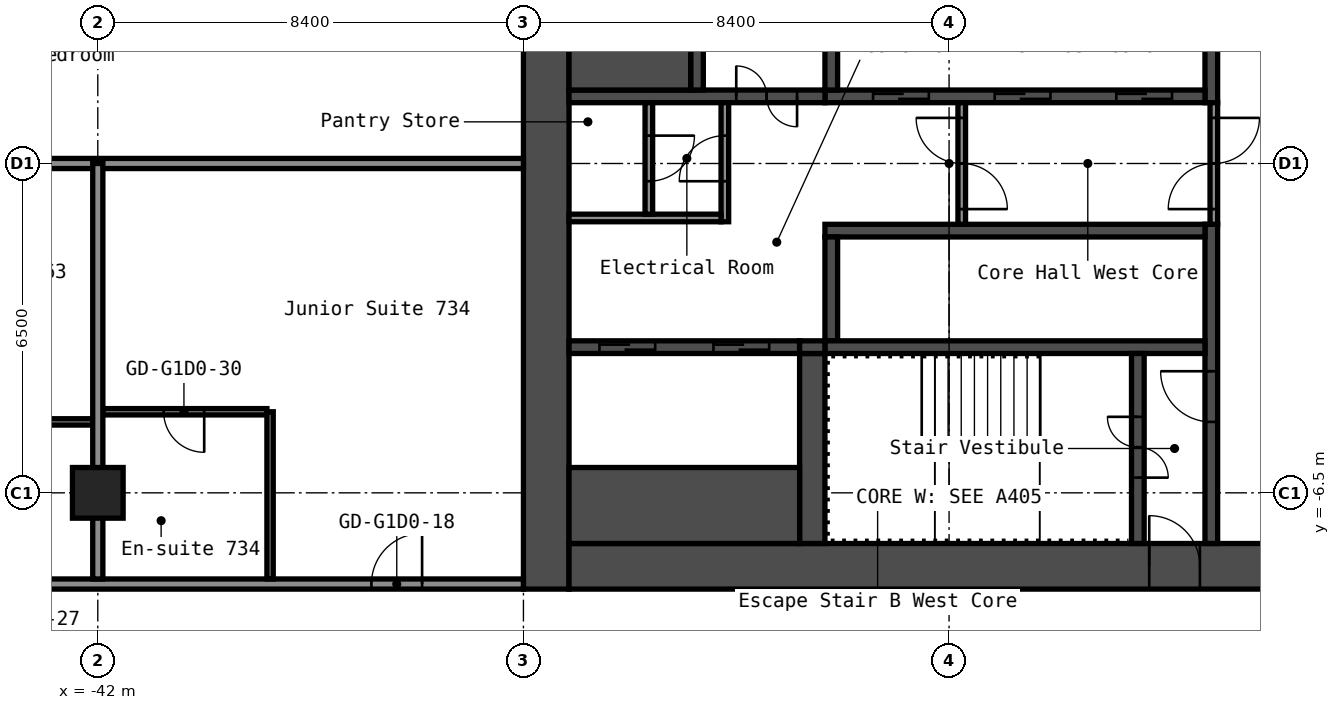
"""IFC4 building model, lengths in metres.
Left out: names, types, materials, properties, quantities, classifications, styles, units other than length and angle.
Written with IfcOpenShell. Run it as: python <this file> out.ifc"""

import sys

from ifc_helpers import new_model, si_unit, direction, frame, frame_2d, origin, origin_2d, place, context, subcontext, project, spatial, rectangle, hollow_rectangle, extrude, element, fill, save


model = new_model("IFC4")
c1 = context("Model", 3, precision=1e-05, world=origin(), true_north=direction((0.0, 1.0)))
c2 = subcontext(c1, "Body", "Model", "MODEL_VIEW")
j1 = project(units=[si_unit("LENGTHUNIT", "METRE"), si_unit("PLANEANGLEUNIT", "RADIAN")], contexts=[c1])
p1 = place(None, origin())
s1 = spatial("IfcSite", under=j1, at=p1, CompositionType="ELEMENT")
p2 = place(p1, origin())
s2 = spatial("IfcBuilding", under=s1, at=p2, CompositionType="ELEMENT")
p3 = place(p2, frame((0.0, 0.0, 29.4)))
s3 = spatial("IfcBuildingStorey", under=s2, at=p3, CompositionType="ELEMENT", Elevation=29.4)
p4 = place(p3, frame((-42.0, -6.5, 0.0), z_axis=(0.0, 0.0, 1.0), x_axis=(1.0, 0.0, 0.0)))
e1 = element("IfcColumn", 1, at=p4, inside=s3, PredefinedType="COLUMN", context=c2, shape_type="SweptSolid", body=[
    extrude(hollow_rectangle(XDim=1.0, YDim=1.0, WallThickness=0.04, at=origin_2d()), origin(), (0.0, 0.0, 1.0), 2.8),
])
p5 = place(p3, frame((-33.15, -8.4, 0.0), z_axis=(0.0, 0.0, 1.0), x_axis=(0.0, 1.0, 0.0)))
e2 = element("IfcWall", 2, at=p5, inside=s3, PredefinedType="SHEAR", context=c2, shape_type="SweptSolid", body=[
    extrude(rectangle(XDim=16.8, YDim=0.9, at=frame_2d((8.4, 0.0))), origin(), (0.0, 0.0, 1.0), 2.8),
])
p6 = place(p3, frame((-32.7, -7.95, 0.0), z_axis=(0.0, 0.0, 1.0), x_axis=(1.0, 0.0, 0.0)))
e3 = element("IfcWall", 3, at=p6, inside=s3, PredefinedType="SHEAR", context=c2, shape_type="SweptSolid", body=[
    extrude(rectangle(XDim=15.0, YDim=0.9, at=frame_2d((7.5, 0.0))), origin(), (0.0, 0.0, 1.0), 2.8),
])
p7 = place(p6, frame((11.45, 0.0, 0.0)))
e4 = element("IfcOpeningElement", 4, at=p7, cuts=e3, PredefinedType="OPENING", context=c2, shape_type="SweptSolid", body=[
    extrude(rectangle(XDim=1.0, YDim=2.1, at=frame_2d((0.5, 1.05))), frame((0.0, 0.46, 0.0), z_axis=(0.0, -1.0, 0.0), x_axis=(1.0, 0.0, 0.0)), (0.0, 0.0, 1.0), 0.92),
])
p8 = place(p3, frame((-20.025, 1.2, 0.0), z_axis=(0.0, 0.0, 1.0), x_axis=(0.0, 1.0, 0.0)))
e5 = element("IfcWall", 5, at=p8, inside=s3, PredefinedType="SHEAR", context=c2, shape_type="SweptSolid", body=[
    extrude(rectangle(XDim=6.3, YDim=0.25, at=frame_2d((3.15, 0.0))), origin(), (0.0, 0.0, 1.0), 2.8),
])
p9 = place(p3, frame((-20.025, -7.5, 0.0), z_axis=(0.0, 0.0, 1.0), x_axis=(0.0, 1.0, 0.0)))
e6 = element("IfcWall", 6, at=p9, inside=s3, PredefinedType="SHEAR", context=c2, shape_type="SweptSolid", body=[
    extrude(rectangle(XDim=6.3, YDim=0.25, at=frame_2d((3.15, 0.0))), origin(), (0.0, 0.0, 1.0), 2.8),
])
p10 = place(p9, frame((2.4, 0.0, 0.0)))
e7 = element("IfcOpeningElement", 7, at=p10, cuts=e6, PredefinedType="OPENING", context=c2, shape_type="SweptSolid", body=[
    extrude(rectangle(XDim=1.0, YDim=2.1, at=frame_2d((0.5, 1.05))), frame((0.0, 0.135, 0.0), z_axis=(0.0, -1.0, 0.0), x_axis=(1.0, 0.0, 0.0)), (0.0, 0.0, 1.0), 0.27),
])
p11 = place(p3, frame((-27.65, 1.325, 0.0), z_axis=(0.0, 0.0, 1.0), x_axis=(1.0, 0.0, 0.0)))
e8 = element("IfcWall", 8, at=p11, inside=s3, PredefinedType="SHEAR", context=c2, shape_type="SweptSolid", body=[
    extrude(rectangle(XDim=7.5, YDim=0.25, at=frame_2d((3.75, 0.0))), origin(), (0.0, 0.0, 1.0), 2.8),
])
p12 = place(p11, frame((5.75, 0.0, 0.0)))
e9 = element("IfcOpeningElement", 9, at=p12, cuts=e8, PredefinedType="OPENING", context=c2, shape_type="SweptSolid", body=[
    extrude(rectangle(XDim=1.1, YDim=2.1, at=frame_2d((0.55, 1.05))), frame((0.0, 0.135, 0.0), z_axis=(0.0, -1.0, 0.0), x_axis=(1.0, 0.0, 0.0)), (0.0, 0.0, 1.0), 0.27),
])
p13 = place(p11, frame((3.35, 0.0, 0.0)))
e10 = element("IfcOpeningElement", 10, at=p13, cuts=e8, PredefinedType="OPENING", context=c2, shape_type="SweptSolid", body=[
    extrude(rectangle(XDim=1.1, YDim=2.1, at=frame_2d((0.55, 1.05))), frame((0.0, 0.135, 0.0), z_axis=(0.0, -1.0, 0.0), x_axis=(1.0, 0.0, 0.0)), (0.0, 0.0, 1.0), 0.27),
])
p14 = place(p11, frame((0.95, 0.0, 0.0)))
e11 = element("IfcOpeningElement", 11, at=p14, cuts=e8, PredefinedType="OPENING", context=c2, shape_type="SweptSolid", body=[
    extrude(rectangle(XDim=1.1, YDim=2.1, at=frame_2d((0.55, 1.05))), frame((0.0, 0.135, 0.0), z_axis=(0.0, -1.0, 0.0), x_axis=(1.0, 0.0, 0.0)), (0.0, 0.0, 1.0), 0.27),
])
p15 = place(p3, frame((-27.525, 1.45, 0.0), z_axis=(0.0, 0.0, 1.0), x_axis=(0.0, 1.0, 0.0)))
e12 = element("IfcWall", 12, at=p15, inside=s3, PredefinedType="SHEAR", context=c2, shape_type="SweptSolid", body=[
    extrude(rectangle(XDim=2.05, YDim=0.25, at=frame_2d((1.025, 0.0))), origin(), (0.0, 0.0, 1.0), 2.8),
])
p16 = place(p3, frame((-32.7, 1.325, 0.0), z_axis=(0.0, 0.0, 1.0), x_axis=(1.0, 0.0, 0.0)))
e13 = element("IfcWall", 13, at=p16, inside=s3, PredefinedType="SHEAR", context=c2, shape_type="SweptSolid", body=[
    extrude(rectangle(XDim=5.05, YDim=0.25, at=frame_2d((2.525, 0.0))), origin(), (0.0, 0.0, 1.0), 2.8),
])
p17 = place(p16, frame((3.3, 0.0, 0.0)))
e14 = element("IfcOpeningElement", 14, at=p17, cuts=e13, PredefinedType="OPENING", context=c2, shape_type="SweptSolid", body=[
    extrude(rectangle(XDim=1.2, YDim=2.1, at=frame_2d((0.6, 1.05))), frame((0.0, 0.135, 0.0), z_axis=(0.0, -1.0, 0.0), x_axis=(1.0, 0.0, 0.0)), (0.0, 0.0, 1.0), 0.27),
])
p18 = place(p3, frame((-30.175, 1.45, 0.0), z_axis=(0.0, 0.0, 1.0), x_axis=(0.0, 1.0, 0.0)))
e15 = element("IfcWall", 15, at=p18, inside=s3, PredefinedType="SHEAR", context=c2, shape_type="SweptSolid", body=[
    extrude(rectangle(XDim=6.05, YDim=0.25, at=frame_2d((3.025, 0.0))), origin(), (0.0, 0.0, 1.0), 2.8),
])
p19 = place(p18, frame((2.625, 0.0, 0.0)))
e16 = element("IfcOpeningElement", 16, at=p19, cuts=e15, PredefinedType="OPENING", context=c2, shape_type="SweptSolid", body=[
    extrude(rectangle(XDim=1.1, YDim=2.1, at=frame_2d((0.55, 1.05))), frame((0.0, 0.135, 0.0), z_axis=(0.0, -1.0, 0.0), x_axis=(1.0, 0.0, 0.0)), (0.0, 0.0, 1.0), 0.27),
])
p20 = place(p3, frame((-32.7, 2.375, 0.0), z_axis=(0.0, 0.0, 1.0), x_axis=(1.0, 0.0, 0.0)))
e17 = element("IfcWall", 17, at=p20, inside=s3, PredefinedType="SHEAR", context=c2, shape_type="SweptSolid", body=[
    extrude(rectangle(XDim=2.4, YDim=1.85, at=frame_2d((1.2, 0.0))), origin(), (0.0, 0.0, 1.0), 2.8),
])
p21 = place(p3, frame((-27.65, -1.325, 0.0), z_axis=(0.0, 0.0, 1.0), x_axis=(1.0, 0.0, 0.0)))
e18 = element("IfcWall", 18, at=p21, inside=s3, PredefinedType="SHEAR", context=c2, shape_type="SweptSolid", body=[
    extrude(rectangle(XDim=7.5, YDim=0.25, at=frame_2d((3.75, 0.0))), origin(), (0.0, 0.0, 1.0), 2.8),
])
p22 = place(p3, frame((-27.525, -3.5, 0.0), z_axis=(0.0, 0.0, 1.0), x_axis=(0.0, 1.0, 0.0)))
e19 = element("IfcWall", 19, at=p22, inside=s3, PredefinedType="SHEAR", context=c2, shape_type="SweptSolid", body=[
    extrude(rectangle(XDim=2.05, YDim=0.25, at=frame_2d((1.025, 0.0))), origin(), (0.0, 0.0, 1.0), 2.8),
])
p23 = place(p3, frame((-27.65, -3.625, 0.0), z_axis=(0.0, 0.0, 1.0), x_axis=(1.0, 0.0, 0.0)))
e20 = element("IfcWall", 20, at=p23, inside=s3, PredefinedType="SHEAR", context=c2, shape_type="SweptSolid", body=[
    extrude(rectangle(XDim=7.5, YDim=0.25, at=frame_2d((3.75, 0.0))), origin(), (0.0, 0.0, 1.0), 2.8),
])
p24 = place(p3, frame((-21.475, -7.5, 0.0), z_axis=(0.0, 0.0, 1.0), x_axis=(0.0, 1.0, 0.0)))
e21 = element("IfcWall", 21, at=p24, inside=s3, PredefinedType="SHEAR", context=c2, shape_type="SweptSolid", body=[
    extrude(rectangle(XDim=3.75, YDim=0.25, at=frame_2d((1.875, 0.0))), origin(), (0.0, 0.0, 1.0), 2.8),
])
p25 = place(p24, frame((1.3, 0.0, 0.0)))
e22 = element("IfcOpeningElement", 22, at=p25, cuts=e21, PredefinedType="OPENING", context=c2, shape_type="SweptSolid", body=[
    extrude(rectangle(XDim=1.2, YDim=2.1, at=frame_2d((0.6, 1.05))), frame((0.0, 0.135, 0.0), z_axis=(0.0, -1.0, 0.0), x_axis=(1.0, 0.0, 0.0)), (0.0, 0.0, 1.0), 0.27),
])
p26 = place(p3, frame((-27.9, -7.5, 0.0), z_axis=(0.0, 0.0, 1.0), x_axis=(0.0, 1.0, 0.0)))
e23 = element("IfcWall", 23, at=p26, inside=s3, PredefinedType="SHEAR", context=c2, shape_type="SweptSolid", body=[
    extrude(rectangle(XDim=3.75, YDim=0.5, at=frame_2d((1.875, 0.0))), origin(), (0.0, 0.0, 1.0), 2.8),
])
p27 = place(p3, frame((-32.7, -3.625, 0.0), z_axis=(0.0, 0.0, 1.0), x_axis=(1.0, 0.0, 0.0)))
e24 = element("IfcWall", 24, at=p27, inside=s3, PredefinedType="SHEAR", context=c2, shape_type="SweptSolid", body=[
    extrude(rectangle(XDim=4.55, YDim=0.25, at=frame_2d((2.275, 0.0))), origin(), (0.0, 0.0, 1.0), 2.8),
])
p28 = place(p27, frame((2.85, 0.0, 0.0)))
e25 = element("IfcOpeningElement", 25, at=p28, cuts=e24, PredefinedType="OPENING", context=c2, shape_type="SweptSolid", body=[
    extrude(rectangle(XDim=1.1, YDim=2.1, at=frame_2d((0.55, 1.05))), frame((0.0, 0.135, 0.0), z_axis=(0.0, -1.0, 0.0), x_axis=(1.0, 0.0, 0.0)), (0.0, 0.0, 1.0), 0.27),
])
p29 = place(p27, frame((0.6, 0.0, 0.0)))
e26 = element("IfcOpeningElement", 26, at=p29, cuts=e24, PredefinedType="OPENING", context=c2, shape_type="SweptSolid", body=[
    extrude(rectangle(XDim=1.1, YDim=2.1, at=frame_2d((0.55, 1.05))), frame((0.0, 0.135, 0.0), z_axis=(0.0, -1.0, 0.0), x_axis=(1.0, 0.0, 0.0)), (0.0, 0.0, 1.0), 0.27),
])
p30 = place(p3, frame((-32.7, -6.75, 0.0), z_axis=(0.0, 0.0, 1.0), x_axis=(1.0, 0.0, 0.0)))
e27 = element("IfcWall", 27, at=p30, inside=s3, PredefinedType="SHEAR", context=c2, shape_type="SweptSolid", body=[
    extrude(rectangle(XDim=4.55, YDim=1.5, at=frame_2d((2.275, 0.0))), origin(), (0.0, 0.0, 1.0), 2.8),
])
p31 = place(p3, frame((-28.15, -3.625, 0.0), z_axis=(0.0, 0.0, 1.0), x_axis=(1.0, 0.0, 0.0)))
e28 = element("IfcWall", 28, at=p31, inside=s3, PredefinedType="SHEAR", context=c2, shape_type="SweptSolid", body=[
    extrude(rectangle(XDim=0.5, YDim=0.25, at=frame_2d((0.25, 0.0))), origin(), (0.0, 0.0, 1.0), 2.8),
])
p32 = place(p3, frame((-19.975, -1.2, 0.0), z_axis=(0.0, 0.0, 1.0), x_axis=(0.0, 1.0, 0.0)))
e29 = element("IfcWall", 29, at=p32, inside=s3, PredefinedType="PARTITIONING", context=c2, shape_type="SweptSolid", body=[
    extrude(rectangle(XDim=2.4, YDim=0.15, at=frame_2d((1.2, 0.0))), origin(), (0.0, 0.0, 1.0), 2.8),
])
p33 = place(p32, frame((0.3, 0.0, 0.0)))
e30 = element("IfcOpeningElement", 30, at=p33, cuts=e29, PredefinedType="OPENING", context=c2, shape_type="SweptSolid", body=[
    extrude(rectangle(XDim=1.8, YDim=2.1, at=frame_2d((0.9, 1.05))), frame((0.0, 0.085, 0.0), z_axis=(0.0, -1.0, 0.0), x_axis=(1.0, 0.0, 0.0)), (0.0, 0.0, 1.0), 0.17),
])
p34 = place(p3, frame((-24.95, -1.2, 0.0), z_axis=(0.0, 0.0, 1.0), x_axis=(0.0, 1.0, 0.0)))
e31 = element("IfcWall", 31, at=p34, inside=s3, PredefinedType="PARTITIONING", context=c2, shape_type="SweptSolid", body=[
    extrude(rectangle(XDim=2.4, YDim=0.15, at=frame_2d((1.2, 0.0))), origin(), (0.0, 0.0, 1.0), 2.8),
])
p35 = place(p34, frame((0.3, 0.0, 0.0)))
e32 = element("IfcOpeningElement", 32, at=p35, cuts=e31, PredefinedType="OPENING", context=c2, shape_type="SweptSolid", body=[
    extrude(rectangle(XDim=1.8, YDim=2.1, at=frame_2d((0.9, 1.05))), frame((0.0, 0.085, 0.0), z_axis=(0.0, -1.0, 0.0), x_axis=(1.0, 0.0, 0.0)), (0.0, 0.0, 1.0), 0.17),
])
p36 = place(p3, frame((-29.625, -1.15, 0.0), z_axis=(0.0, 0.0, 1.0), x_axis=(0.0, 1.0, 0.0)))
e33 = element("IfcWall", 33, at=p36, inside=s3, PredefinedType="PARTITIONING", context=c2, shape_type="SweptSolid", body=[
    extrude(rectangle(XDim=2.35, YDim=0.15, at=frame_2d((1.175, 0.0))), origin(), (0.0, 0.0, 1.0), 2.8),
])
p37 = place(p36, frame((0.8, 0.0, 0.0)))
e34 = element("IfcOpeningElement", 34, at=p37, cuts=e33, PredefinedType="OPENING", context=c2, shape_type="SweptSolid", body=[
    extrude(rectangle(XDim=0.9, YDim=2.1, at=frame_2d((0.45, 1.05))), frame((0.0, 0.085, 0.0), z_axis=(0.0, -1.0, 0.0), x_axis=(1.0, 0.0, 0.0)), (0.0, 0.0, 1.0), 0.17),
])
p38 = place(p3, frame((-32.7, -1.075, 0.0), z_axis=(0.0, 0.0, 1.0), x_axis=(1.0, 0.0, 0.0)))
e35 = element("IfcWall", 35, at=p38, inside=s3, PredefinedType="PARTITIONING", context=c2, shape_type="SweptSolid", body=[
    extrude(rectangle(XDim=3.0, YDim=0.15, at=frame_2d((1.5, 0.0))), origin(), (0.0, 0.0, 1.0), 2.8),
])
p39 = place(p3, frame((-31.125, -1.0, 0.0), z_axis=(0.0, 0.0, 1.0), x_axis=(0.0, 1.0, 0.0)))
e36 = element("IfcWall", 36, at=p39, inside=s3, PredefinedType="PARTITIONING", context=c2, shape_type="SweptSolid", body=[
    extrude(rectangle(XDim=2.2, YDim=0.15, at=frame_2d((1.1, 0.0))), origin(), (0.0, 0.0, 1.0), 2.8),
])
p40 = place(p39, frame((0.65, 0.0, 0.0)))
e37 = element("IfcOpeningElement", 37, at=p40, cuts=e36, PredefinedType="OPENING", context=c2, shape_type="SweptSolid", body=[
    extrude(rectangle(XDim=0.9, YDim=2.1, at=frame_2d((0.45, 1.05))), frame((0.0, 0.085, 0.0), z_axis=(0.0, -1.0, 0.0), x_axis=(1.0, 0.0, 0.0)), (0.0, 0.0, 1.0), 0.17),
])
p41 = place(p3, frame((-48.6, -8.3, 0.0), z_axis=(0.0, 0.0, 1.0), x_axis=(1.0, 0.0, 0.0)))
e38 = element("IfcWall", 38, at=p41, inside=s3, PredefinedType="PARTITIONING", context=c2, shape_type="SweptSolid", body=[
    extrude(rectangle(XDim=15.0, YDim=0.2, at=frame_2d((7.5, 0.0))), origin(), (0.0, 0.0, 1.0), 2.8),
])
p42 = place(p41, frame((1.15, 0.0, 0.0)))
e39 = element("IfcOpeningElement", 39, at=p42, cuts=e38, PredefinedType="OPENING", context=c2, shape_type="SweptSolid", body=[
    extrude(rectangle(XDim=1.0, YDim=2.1, at=frame_2d((0.5, 1.05))), frame((0.0, 0.11, 0.0), z_axis=(0.0, -1.0, 0.0), x_axis=(1.0, 0.0, 0.0)), (0.0, 0.0, 1.0), 0.22),
])
p43 = place(p41, frame((12.0, 0.0, 0.0)))
e40 = element("IfcOpeningElement", 40, at=p43, cuts=e38, PredefinedType="OPENING", context=c2, shape_type="SweptSolid", body=[
    extrude(rectangle(XDim=1.0, YDim=2.1, at=frame_2d((0.5, 1.05))), frame((0.0, 0.11, 0.0), z_axis=(0.0, -1.0, 0.0), x_axis=(1.0, 0.0, 0.0)), (0.0, 0.0, 1.0), 0.22),
])
p44 = place(p3, frame((-44.938, -5.1, 0.0), z_axis=(0.0, 0.0, 1.0), x_axis=(1.0, 0.0, 0.0)))
e41 = element("IfcWall", 41, at=p44, inside=s3, PredefinedType="PARTITIONING", context=c2, shape_type="SweptSolid", body=[
    extrude(rectangle(XDim=2.837, YDim=0.125, at=frame_2d((1.419, 0.0))), origin(), (0.0, 0.0, 1.0), 2.8),
])
p45 = place(p44, frame((1.038, 0.0, 0.0)))
e42 = element("IfcOpeningElement", 42, at=p45, cuts=e41, PredefinedType="OPENING", context=c2, shape_type="SweptSolid", body=[
    extrude(rectangle(XDim=0.8, YDim=2.1, at=frame_2d((0.4, 1.05))), frame((0.0, 0.073, 0.0), z_axis=(0.0, -1.0, 0.0), x_axis=(1.0, 0.0, 0.0)), (0.0, 0.0, 1.0), 0.145),
])
p46 = place(p3, frame((-41.9, -4.9, 0.0), z_axis=(0.0, 0.0, 1.0), x_axis=(1.0, 0.0, 0.0)))
e43 = element("IfcWall", 43, at=p46, inside=s3, PredefinedType="PARTITIONING", context=c2, shape_type="SweptSolid", body=[
    extrude(rectangle(XDim=3.237, YDim=0.125, at=frame_2d((1.619, 0.0))), origin(), (0.0, 0.0, 1.0), 2.8),
])
p47 = place(p46, frame((1.2, 0.0, 0.0)))
e44 = element("IfcOpeningElement", 44, at=p47, cuts=e43, PredefinedType="OPENING", context=c2, shape_type="SweptSolid", body=[
    extrude(rectangle(XDim=0.8, YDim=2.1, at=frame_2d((0.4, 1.05))), frame((0.0, 0.073, 0.0), z_axis=(0.0, -1.0, 0.0), x_axis=(1.0, 0.0, 0.0)), (0.0, 0.0, 1.0), 0.145),
])
p48 = place(p3, frame((-48.5, 0.0, 0.0), z_axis=(0.0, 0.0, 1.0), x_axis=(1.0, 0.0, 0.0)))
e45 = element("IfcWall", 45, at=p48, inside=s3, PredefinedType="PARTITIONING", context=c2, shape_type="SweptSolid", body=[
    extrude(rectangle(XDim=14.9, YDim=0.2, at=frame_2d((7.45, 0.0))), origin(), (0.0, 0.0, 1.0), 2.8),
])
p49 = place(p3, frame((-42.0, -8.2, 0.0), z_axis=(0.0, 0.0, 1.0), x_axis=(0.0, 1.0, 0.0)))
e46 = element("IfcWall", 46, at=p49, inside=s3, PredefinedType="PARTITIONING", context=c2, shape_type="SweptSolid", body=[
    extrude(rectangle(XDim=8.2, YDim=0.2, at=frame_2d((4.1, 0.0))), origin(), (0.0, 0.0, 1.0), 2.8),
])
p50 = place(p3, frame((-38.6, -8.2, 0.0), z_axis=(0.0, 0.0, 1.0), x_axis=(0.0, 1.0, 0.0)))
e47 = element("IfcWall", 47, at=p50, inside=s3, PredefinedType="PARTITIONING", context=c2, shape_type="SweptSolid", body=[
    extrude(rectangle(XDim=3.3, YDim=0.125, at=frame_2d((1.65, 0.0))), origin(), (0.0, 0.0, 1.0), 2.8),
])
p51 = place(p7, origin())
e48 = element("IfcDoor", 48, at=p51, inside=s3, OperationType="SINGLE_SWING_RIGHT", PredefinedType="DOOR", context=c2, shape_type="SweptSolid", body=[
    extrude(rectangle(XDim=1.0, YDim=2.1, at=frame_2d((0.5, 1.05))), frame((0.0, 0.025, 0.0), z_axis=(0.0, -1.0, 0.0), x_axis=(1.0, 0.0, 0.0)), (0.0, 0.0, 1.0), 0.05),
])
fill(e4, e48)
p52 = place(p25, origin())
e49 = element("IfcDoor", 49, at=p52, inside=s3, OperationType="DOUBLE_DOOR_SINGLE_SWING", PredefinedType="DOOR", context=c2, shape_type="SweptSolid", body=[
    extrude(rectangle(XDim=1.2, YDim=2.1, at=frame_2d((0.6, 1.05))), frame((0.0, 0.025, 0.0), z_axis=(0.0, -1.0, 0.0), x_axis=(1.0, 0.0, 0.0)), (0.0, 0.0, 1.0), 0.05),
])
fill(e22, e49)
p53 = place(p10, origin())
e50 = element("IfcDoor", 50, at=p53, inside=s3, OperationType="SINGLE_SWING_LEFT", PredefinedType="DOOR", context=c2, shape_type="SweptSolid", body=[
    extrude(rectangle(XDim=1.0, YDim=2.1, at=frame_2d((0.5, 1.05))), frame((0.0, 0.025, 0.0), z_axis=(0.0, -1.0, 0.0), x_axis=(1.0, 0.0, 0.0)), (0.0, 0.0, 1.0), 0.05),
])
fill(e7, e50)
p54 = place(p17, origin())
e51 = element("IfcDoor", 51, at=p54, inside=s3, OperationType="DOUBLE_DOOR_SINGLE_SWING", PredefinedType="DOOR", context=c2, shape_type="SweptSolid", body=[
    extrude(rectangle(XDim=1.2, YDim=2.1, at=frame_2d((0.6, 1.05))), frame((0.0, 0.025, 0.0), z_axis=(0.0, -1.0, 0.0), x_axis=(1.0, 0.0, 0.0)), (0.0, 0.0, 1.0), 0.05),
])
fill(e14, e51)
p55 = place(p33, origin())
e52 = element("IfcDoor", 52, at=p55, inside=s3, OperationType="DOUBLE_DOOR_SINGLE_SWING", PredefinedType="DOOR", context=c2, shape_type="SweptSolid", body=[
    extrude(rectangle(XDim=1.8, YDim=2.1, at=frame_2d((0.9, 1.05))), frame((0.0, 0.025, 0.0), z_axis=(0.0, -1.0, 0.0), x_axis=(1.0, 0.0, 0.0)), (0.0, 0.0, 1.0), 0.05),
])
fill(e30, e52)
p56 = place(p35, origin())
e53 = element("IfcDoor", 53, at=p56, inside=s3, OperationType="DOUBLE_DOOR_SINGLE_SWING", PredefinedType="DOOR", context=c2, shape_type="SweptSolid", body=[
    extrude(rectangle(XDim=1.8, YDim=2.1, at=frame_2d((0.9, 1.05))), frame((0.0, 0.025, 0.0), z_axis=(0.0, -1.0, 0.0), x_axis=(1.0, 0.0, 0.0)), (0.0, 0.0, 1.0), 0.05),
])
fill(e32, e53)
p57 = place(p37, origin())
e54 = element("IfcDoor", 54, at=p57, inside=s3, OperationType="SINGLE_SWING_RIGHT", PredefinedType="DOOR", context=c2, shape_type="SweptSolid", body=[
    extrude(rectangle(XDim=0.9, YDim=2.1, at=frame_2d((0.45, 1.05))), frame((0.0, 0.025, 0.0), z_axis=(0.0, -1.0, 0.0), x_axis=(1.0, 0.0, 0.0)), (0.0, 0.0, 1.0), 0.05),
])
fill(e34, e54)
p58 = place(p40, origin())
e55 = element("IfcDoor", 55, at=p58, inside=s3, OperationType="SINGLE_SWING_RIGHT", PredefinedType="DOOR", context=c2, shape_type="SweptSolid", body=[
    extrude(rectangle(XDim=0.9, YDim=2.1, at=frame_2d((0.45, 1.05))), frame((0.0, 0.025, 0.0), z_axis=(0.0, -1.0, 0.0), x_axis=(1.0, 0.0, 0.0)), (0.0, 0.0, 1.0), 0.05),
])
fill(e37, e55)
p59 = place(p12, origin())
e56 = element("IfcDoor", 56, at=p59, inside=s3, OperationType="DOUBLE_DOOR_SLIDING", PredefinedType="DOOR", context=c2, shape_type="SweptSolid", body=[
    extrude(rectangle(XDim=1.1, YDim=2.1, at=frame_2d((0.55, 1.05))), frame((0.0, 0.025, 0.0), z_axis=(0.0, -1.0, 0.0), x_axis=(1.0, 0.0, 0.0)), (0.0, 0.0, 1.0), 0.05),
])
fill(e9, e56)
p60 = place(p13, origin())
e57 = element("IfcDoor", 57, at=p60, inside=s3, OperationType="DOUBLE_DOOR_SLIDING", PredefinedType="DOOR", context=c2, shape_type="SweptSolid", body=[
    extrude(rectangle(XDim=1.1, YDim=2.1, at=frame_2d((0.55, 1.05))), frame((0.0, 0.025, 0.0), z_axis=(0.0, -1.0, 0.0), x_axis=(1.0, 0.0, 0.0)), (0.0, 0.0, 1.0), 0.05),
])
fill(e10, e57)
p61 = place(p14, origin())
e58 = element("IfcDoor", 58, at=p61, inside=s3, OperationType="DOUBLE_DOOR_SLIDING", PredefinedType="DOOR", context=c2, shape_type="SweptSolid", body=[
    extrude(rectangle(XDim=1.1, YDim=2.1, at=frame_2d((0.55, 1.05))), frame((0.0, 0.025, 0.0), z_axis=(0.0, -1.0, 0.0), x_axis=(1.0, 0.0, 0.0)), (0.0, 0.0, 1.0), 0.05),
])
fill(e11, e58)
p62 = place(p28, origin())
e59 = element("IfcDoor", 59, at=p62, inside=s3, OperationType="DOUBLE_DOOR_SLIDING", PredefinedType="DOOR", context=c2, shape_type="SweptSolid", body=[
    extrude(rectangle(XDim=1.1, YDim=2.1, at=frame_2d((0.55, 1.05))), frame((0.0, 0.025, 0.0), z_axis=(0.0, -1.0, 0.0), x_axis=(1.0, 0.0, 0.0)), (0.0, 0.0, 1.0), 0.05),
])
fill(e25, e59)
p63 = place(p29, origin())
e60 = element("IfcDoor", 60, at=p63, inside=s3, OperationType="DOUBLE_DOOR_SLIDING", PredefinedType="DOOR", context=c2, shape_type="SweptSolid", body=[
    extrude(rectangle(XDim=1.1, YDim=2.1, at=frame_2d((0.55, 1.05))), frame((0.0, 0.025, 0.0), z_axis=(0.0, -1.0, 0.0), x_axis=(1.0, 0.0, 0.0)), (0.0, 0.0, 1.0), 0.05),
])
fill(e26, e60)
p64 = place(p43, origin())
e61 = element("IfcDoor", 61, at=p64, inside=s3, OperationType="SINGLE_SWING_LEFT", PredefinedType="DOOR", context=c2, shape_type="SweptSolid", body=[
    extrude(rectangle(XDim=1.0, YDim=2.1, at=frame_2d((0.5, 1.05))), frame((0.0, 0.025, 0.0), z_axis=(0.0, -1.0, 0.0), x_axis=(1.0, 0.0, 0.0)), (0.0, 0.0, 1.0), 0.05),
])
fill(e40, e61)
p65 = place(p47, origin())
e62 = element("IfcDoor", 62, at=p65, inside=s3, OperationType="SINGLE_SWING_RIGHT", PredefinedType="DOOR", context=c2, shape_type="SweptSolid", body=[
    extrude(rectangle(XDim=0.8, YDim=2.1, at=frame_2d((0.4, 1.05))), frame((0.0, 0.025, 0.0), z_axis=(0.0, -1.0, 0.0), x_axis=(1.0, 0.0, 0.0)), (0.0, 0.0, 1.0), 0.05),
])
fill(e44, e62)
save(model, sys.argv[1])
